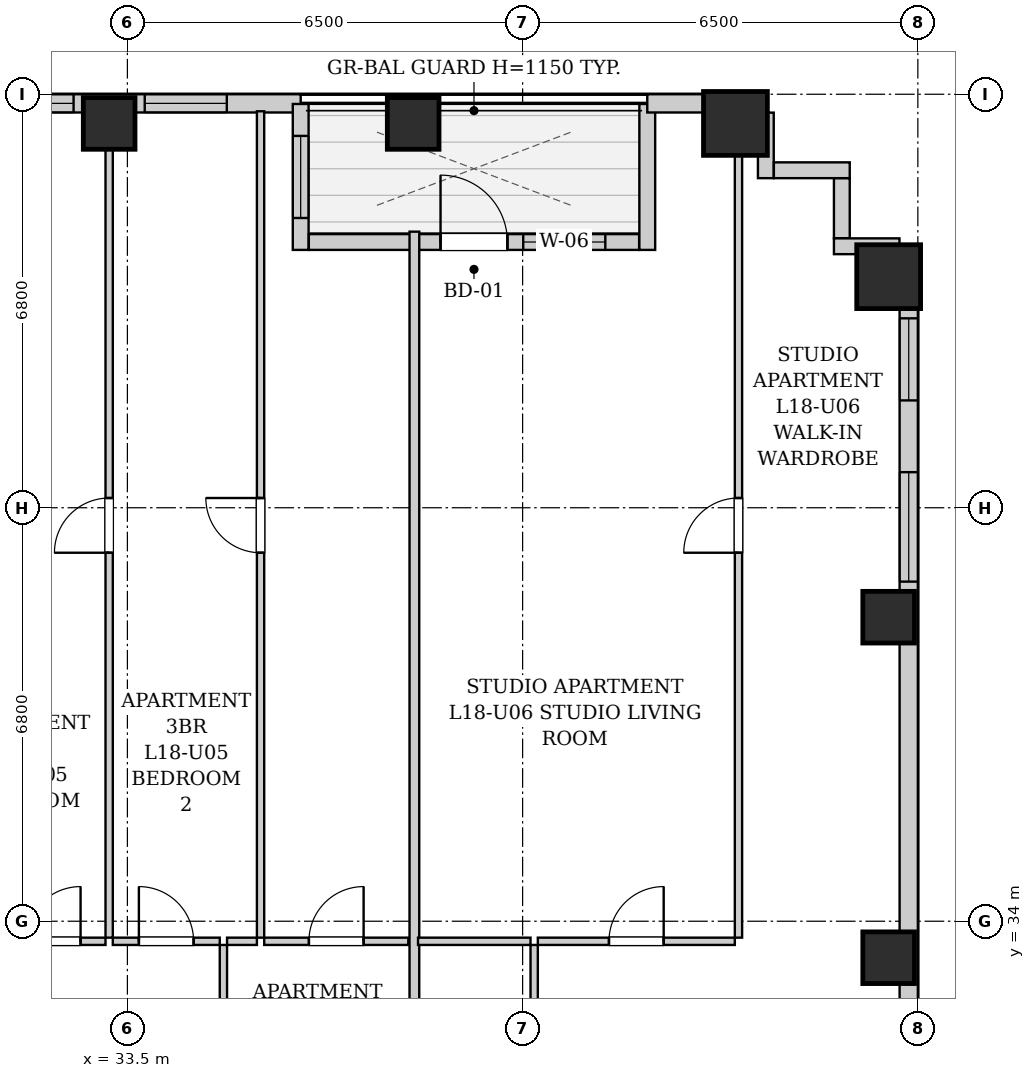
"""IFC4 building model, lengths in metres.
Left out: names, types, materials, properties, quantities, classifications, styles, units other than length and angle.
Written with IfcOpenShell. Run it as: python <this file> out.ifc"""

import sys

from ifc_helpers import new_model, si_unit, direction, frame, frame_2d, origin, origin_2d, place, context, subcontext, project, spatial, rectangle, extrude, element, fill, save


model = new_model("IFC4")
c1 = context("Model", 3, precision=1e-05, world=origin(), true_north=direction((0.0, 1.0)))
c2 = subcontext(c1, "Body", "Model", "MODEL_VIEW")
j1 = project(units=[si_unit("LENGTHUNIT", "METRE"), si_unit("PLANEANGLEUNIT", "RADIAN")], contexts=[c1])
p1 = place(None, origin())
s1 = spatial("IfcSite", under=j1, at=p1, CompositionType="ELEMENT")
p2 = place(p1, origin())
s2 = spatial("IfcBuilding", under=s1, at=p2, CompositionType="ELEMENT")
p3 = place(p2, frame((0.0, 0.0, 67.4)))
s3 = spatial("IfcBuildingStorey", under=s2, at=p3, CompositionType="ELEMENT", Elevation=67.4)
for number, where, z_axis, x_axis in (
    (1, (33.2, 47.12, 0.0), (0.0, 0.0, 1.0), (1.0, 0.0, 0.0)),
    (2, (38.2, 47.12, 0.0), (0.0, 0.0, 1.0), (1.0, 0.0, 0.0)),
):
    element("IfcColumn", number, at=place(p3, frame(where, z_axis=z_axis, x_axis=x_axis)), inside=s3, PredefinedType="COLUMN", context=c2, shape_type="SweptSolid", body=[
        extrude(rectangle(XDim=0.85, YDim=0.85, at=origin_2d()), origin(), (0.0, 0.0, 1.0), 3.2),
    ])
p4 = place(p3, frame((43.5, 47.12, 0.0), z_axis=(0.0, 0.0, 1.0), x_axis=(1.0, 0.0, 0.0)))
e3 = element("IfcColumn", 3, at=p4, inside=s3, PredefinedType="COLUMN", context=c2, shape_type="SweptSolid", body=[
    extrude(rectangle(XDim=1.05, YDim=1.05, at=origin_2d()), origin(), (0.0, 0.0, 1.0), 3.2),
])
for number, where, z_axis, x_axis in (
    (4, (46.02, 33.4, 0.0), (0.0, 0.0, 1.0), (1.0, 0.0, 0.0)),
    (5, (46.02, 39.0, 0.0), (0.0, 0.0, 1.0), (1.0, 0.0, 0.0)),
):
    element("IfcColumn", number, at=place(p3, frame(where, z_axis=z_axis, x_axis=x_axis)), inside=s3, PredefinedType="COLUMN", context=c2, shape_type="SweptSolid", body=[
        extrude(rectangle(XDim=0.85, YDim=0.85, at=origin_2d()), origin(), (0.0, 0.0, 1.0), 3.2),
    ])
p5 = place(p3, frame((46.02, 44.6, 0.0), z_axis=(0.0, 0.0, 1.0), x_axis=(1.0, 0.0, 0.0)))
e6 = element("IfcColumn", 6, at=p5, inside=s3, PredefinedType="COLUMN", context=c2, shape_type="SweptSolid", body=[
    extrude(rectangle(XDim=1.05, YDim=1.05, at=origin_2d()), origin(), (0.0, 0.0, 1.0), 3.2),
])
p6 = place(p3, frame((10.0, 47.45, 0.0), z_axis=(0.0, 0.0, 1.0), x_axis=(1.0, 0.0, 0.0)))
e7 = element("IfcWall", 7, at=p6, inside=s3, PredefinedType="SOLIDWALL", context=c2, shape_type="SweptSolid", body=[
    extrude(rectangle(XDim=26.35, YDim=0.3, at=frame_2d((13.175, 0.0))), origin(), (0.0, 0.0, 1.0), 1.915),
])
p7 = place(p6, frame((1.735, 0.0, 0.55)))
e8 = element("IfcOpeningElement", 8, at=p7, cuts=e7, PredefinedType="OPENING", context=c2, shape_type="SweptSolid", body=[
    extrude(rectangle(XDim=1.8, YDim=1.2, at=frame_2d((0.9, 0.6))), frame((0.0, 0.16, 0.0), z_axis=(0.0, -1.0, 0.0), x_axis=(1.0, 0.0, 0.0)), (0.0, 0.0, 1.0), 0.32),
])
p8 = place(p6, frame((5.415, 0.0, 0.55)))
e9 = element("IfcOpeningElement", 9, at=p8, cuts=e7, PredefinedType="OPENING", context=c2, shape_type="SweptSolid", body=[
    extrude(rectangle(XDim=1.8, YDim=1.2, at=frame_2d((0.9, 0.6))), frame((0.0, 0.16, 0.0), z_axis=(0.0, -1.0, 0.0), x_axis=(1.0, 0.0, 0.0)), (0.0, 0.0, 1.0), 0.32),
])
p9 = place(p6, frame((10.618, 0.0, 0.55)))
e10 = element("IfcOpeningElement", 10, at=p9, cuts=e7, PredefinedType="OPENING", context=c2, shape_type="SweptSolid", body=[
    extrude(rectangle(XDim=1.8, YDim=1.2, at=frame_2d((0.9, 0.6))), frame((0.0, 0.16, 0.0), z_axis=(0.0, -1.0, 0.0), x_axis=(1.0, 0.0, 0.0)), (0.0, 0.0, 1.0), 0.32),
])
p10 = place(p6, frame((17.696, 0.0, 0.55)))
e11 = element("IfcOpeningElement", 11, at=p10, cuts=e7, PredefinedType="OPENING", context=c2, shape_type="SweptSolid", body=[
    extrude(rectangle(XDim=1.8, YDim=1.2, at=frame_2d((0.9, 0.6))), frame((0.0, 0.16, 0.0), z_axis=(0.0, -1.0, 0.0), x_axis=(1.0, 0.0, 0.0)), (0.0, 0.0, 1.0), 0.32),
])
p11 = place(p6, frame((20.815, 0.0, 0.55)))
e12 = element("IfcOpeningElement", 12, at=p11, cuts=e7, PredefinedType="OPENING", context=c2, shape_type="SweptSolid", body=[
    extrude(rectangle(XDim=1.8, YDim=1.2, at=frame_2d((0.9, 0.6))), frame((0.0, 0.16, 0.0), z_axis=(0.0, -1.0, 0.0), x_axis=(1.0, 0.0, 0.0)), (0.0, 0.0, 1.0), 0.32),
])
p12 = place(p6, frame((23.785, 0.0, 0.55)))
e13 = element("IfcOpeningElement", 13, at=p12, cuts=e7, PredefinedType="OPENING", context=c2, shape_type="SweptSolid", body=[
    extrude(rectangle(XDim=1.35, YDim=1.2, at=frame_2d((0.675, 0.6))), frame((0.0, 0.16, 0.0), z_axis=(0.0, -1.0, 0.0), x_axis=(1.0, 0.0, 0.0)), (0.0, 0.0, 1.0), 0.32),
])
p13 = place(p3, frame((36.35, 47.44, 0.0), z_axis=(0.0, 0.0, 1.0), x_axis=(0.0, -1.0, 0.0)))
e14 = element("IfcWall", 14, at=p13, inside=s3, PredefinedType="SOLIDWALL", context=c2, shape_type="SweptSolid", body=[
    extrude(rectangle(XDim=2.4, YDim=0.26, at=frame_2d((1.2, 0.0))), origin(), (0.0, 0.0, 1.0), 2.88),
])
p14 = place(p13, frame((0.525, 0.0, 0.55)))
e15 = element("IfcOpeningElement", 15, at=p14, cuts=e14, PredefinedType="OPENING", context=c2, shape_type="SweptSolid", body=[
    extrude(rectangle(XDim=1.35, YDim=1.2, at=frame_2d((0.675, 0.6))), frame((0.0, 0.14, 0.0), z_axis=(0.0, -1.0, 0.0), x_axis=(1.0, 0.0, 0.0)), (0.0, 0.0, 1.0), 0.28),
])
p15 = place(p3, frame((36.484, 45.17, 0.0), z_axis=(0.0, 0.0, 1.0), x_axis=(1.0, 0.0, 0.0)))
e16 = element("IfcWall", 16, at=p15, inside=s3, PredefinedType="SOLIDWALL", context=c2, shape_type="SweptSolid", body=[
    extrude(rectangle(XDim=5.432, YDim=0.26, at=frame_2d((2.716, 0.0))), origin(), (0.0, 0.0, 1.0), 2.88),
])
p16 = place(p15, frame((2.166, 0.0, 0.0)))
e17 = element("IfcOpeningElement", 17, at=p16, cuts=e16, PredefinedType="OPENING", context=c2, shape_type="SweptSolid", body=[
    extrude(rectangle(XDim=1.1, YDim=2.0, at=frame_2d((0.55, 1.0))), frame((0.0, 0.14, 0.0), z_axis=(0.0, -1.0, 0.0), x_axis=(1.0, 0.0, 0.0)), (0.0, 0.0, 1.0), 0.28),
])
p17 = place(p15, frame((3.526, 0.0, 0.85)))
e18 = element("IfcOpeningElement", 18, at=p17, cuts=e16, PredefinedType="OPENING", context=c2, shape_type="SweptSolid", body=[
    extrude(rectangle(XDim=1.35, YDim=1.65, at=frame_2d((0.675, 0.825))), frame((0.0, 0.14, 0.0), z_axis=(0.0, -1.0, 0.0), x_axis=(1.0, 0.0, 0.0)), (0.0, 0.0, 1.0), 0.28),
])
p18 = place(p3, frame((42.05, 45.04, 0.0), z_axis=(0.0, 0.0, 1.0), x_axis=(0.0, 1.0, 0.0)))
e19 = element("IfcWall", 19, at=p18, inside=s3, PredefinedType="SOLIDWALL", context=c2, shape_type="SweptSolid", body=[
    extrude(rectangle(XDim=2.4, YDim=0.26, at=frame_2d((1.2, 0.0))), origin(), (0.0, 0.0, 1.0), 2.88),
])
p19 = place(p3, frame((42.05, 47.45, 0.0), z_axis=(0.0, 0.0, 1.0), x_axis=(1.0, 0.0, 0.0)))
e20 = element("IfcWall", 20, at=p19, inside=s3, PredefinedType="SOLIDWALL", context=c2, shape_type="SweptSolid", body=[
    extrude(rectangle(XDim=1.95, YDim=0.3, at=frame_2d((0.975, 0.0))), origin(), (0.0, 0.0, 1.0), 1.915),
])
p20 = place(p3, frame((46.35, 45.1, 0.0), z_axis=(0.0, 0.0, 1.0), x_axis=(0.0, -1.0, 0.0)))
e21 = element("IfcWall", 21, at=p20, inside=s3, PredefinedType="SOLIDWALL", context=c2, shape_type="SweptSolid", body=[
    extrude(rectangle(XDim=16.9, YDim=0.3, at=frame_2d((8.45, 0.0))), origin(), (0.0, 0.0, 1.0), 1.915),
])
p21 = place(p20, frame((3.715, 0.0, 0.55)))
e22 = element("IfcOpeningElement", 22, at=p21, cuts=e21, PredefinedType="OPENING", context=c2, shape_type="SweptSolid", body=[
    extrude(rectangle(XDim=1.8, YDim=1.2, at=frame_2d((0.9, 0.6))), frame((0.0, 0.16, 0.0), z_axis=(0.0, -1.0, 0.0), x_axis=(1.0, 0.0, 0.0)), (0.0, 0.0, 1.0), 0.32),
])
p22 = place(p20, frame((1.185, 0.0, 0.55)))
e23 = element("IfcOpeningElement", 23, at=p22, cuts=e21, PredefinedType="OPENING", context=c2, shape_type="SweptSolid", body=[
    extrude(rectangle(XDim=1.35, YDim=1.2, at=frame_2d((0.675, 0.6))), frame((0.0, 0.16, 0.0), z_axis=(0.0, -1.0, 0.0), x_axis=(1.0, 0.0, 0.0)), (0.0, 0.0, 1.0), 0.32),
])
p23 = place(p3, frame((44.0, 47.298, 0.0), z_axis=(0.0, 0.0, 1.0), x_axis=(0.0, -1.0, 0.0)))
e24 = element("IfcWall", 24, at=p23, inside=s3, PredefinedType="SOLIDWALL", context=c2, shape_type="SweptSolid", body=[
    extrude(rectangle(XDim=1.078, YDim=0.26, at=frame_2d((0.539, 0.0))), origin(), (0.0, 0.0, 1.0), 2.88),
])
p24 = place(p3, frame((44.132, 46.35, 0.0), z_axis=(0.0, 0.0, 1.0), x_axis=(1.0, 0.0, 0.0)))
e25 = element("IfcWall", 25, at=p24, inside=s3, PredefinedType="SOLIDWALL", context=c2, shape_type="SweptSolid", body=[
    extrude(rectangle(XDim=1.248, YDim=0.26, at=frame_2d((0.624, 0.0))), origin(), (0.0, 0.0, 1.0), 2.88),
])
p25 = place(p3, frame((45.25, 46.218, 0.0), z_axis=(0.0, 0.0, 1.0), x_axis=(0.0, -1.0, 0.0)))
e26 = element("IfcWall", 26, at=p25, inside=s3, PredefinedType="SOLIDWALL", context=c2, shape_type="SweptSolid", body=[
    extrude(rectangle(XDim=0.986, YDim=0.26, at=frame_2d((0.493, 0.0))), origin(), (0.0, 0.0, 1.0), 2.88),
])
p26 = place(p3, frame((45.12, 45.1, 0.0), z_axis=(0.0, 0.0, 1.0), x_axis=(1.0, 0.0, 0.0)))
e27 = element("IfcWall", 27, at=p26, inside=s3, PredefinedType="SOLIDWALL", context=c2, shape_type="SweptSolid", body=[
    extrude(rectangle(XDim=1.078, YDim=0.26, at=frame_2d((0.539, 0.0))), origin(), (0.0, 0.0, 1.0), 2.88),
])
p27 = place(p3, frame((35.079, 30.76, 0.0), z_axis=(0.0, 0.0, 1.0), x_axis=(0.0, 1.0, 0.0)))
e28 = element("IfcWall", 28, at=p27, inside=s3, PredefinedType="PARTITIONING", context=c2, shape_type="SweptSolid", body=[
    extrude(rectangle(XDim=2.85, YDim=0.12, at=frame_2d((1.425, 0.0))), origin(), (0.0, 0.0, 1.0), 2.88),
])
p28 = place(p27, frame((0.975, 0.0, 0.0)))
e29 = element("IfcOpeningElement", 29, at=p28, cuts=e28, PredefinedType="OPENING", context=c2, shape_type="SweptSolid", body=[
    extrude(rectangle(XDim=0.9, YDim=2.05, at=frame_2d((0.45, 1.025))), frame((0.0, 0.07, 0.0), z_axis=(0.0, -1.0, 0.0), x_axis=(1.0, 0.0, 0.0)), (0.0, 0.0, 1.0), 0.14),
])
p29 = place(p3, frame((31.419, 33.67, 0.0), z_axis=(0.0, 0.0, 1.0), x_axis=(1.0, 0.0, 0.0)))
e30 = element("IfcWall", 30, at=p29, inside=s3, PredefinedType="PARTITIONING", context=c2, shape_type="SweptSolid", body=[
    extrude(rectangle(XDim=1.721, YDim=0.12, at=frame_2d((0.86, 0.0))), origin(), (0.0, 0.0, 1.0), 2.88),
])
p30 = place(p29, frame((0.411, 0.0, 0.0)))
e31 = element("IfcOpeningElement", 31, at=p30, cuts=e30, PredefinedType="OPENING", context=c2, shape_type="SweptSolid", body=[
    extrude(rectangle(XDim=0.9, YDim=2.05, at=frame_2d((0.45, 1.025))), frame((0.0, 0.07, 0.0), z_axis=(0.0, -1.0, 0.0), x_axis=(1.0, 0.0, 0.0)), (0.0, 0.0, 1.0), 0.14),
])
p31 = place(p3, frame((33.26, 33.67, 0.0), z_axis=(0.0, 0.0, 1.0), x_axis=(1.0, 0.0, 0.0)))
e32 = element("IfcWall", 32, at=p31, inside=s3, PredefinedType="PARTITIONING", context=c2, shape_type="SweptSolid", body=[
    extrude(rectangle(XDim=1.759, YDim=0.12, at=frame_2d((0.879, 0.0))), origin(), (0.0, 0.0, 1.0), 2.88),
])
p32 = place(p31, frame((0.429, 0.0, 0.0)))
e33 = element("IfcOpeningElement", 33, at=p32, cuts=e32, PredefinedType="OPENING", context=c2, shape_type="SweptSolid", body=[
    extrude(rectangle(XDim=0.9, YDim=2.05, at=frame_2d((0.45, 1.025))), frame((0.0, 0.07, 0.0), z_axis=(0.0, -1.0, 0.0), x_axis=(1.0, 0.0, 0.0)), (0.0, 0.0, 1.0), 0.14),
])
p33 = place(p3, frame((35.139, 33.67, 0.0), z_axis=(0.0, 0.0, 1.0), x_axis=(1.0, 0.0, 0.0)))
e34 = element("IfcWall", 34, at=p33, inside=s3, PredefinedType="PARTITIONING", context=c2, shape_type="SweptSolid", body=[
    extrude(rectangle(XDim=0.491, YDim=0.12, at=frame_2d((0.246, 0.0))), origin(), (0.0, 0.0, 1.0), 2.88),
])
p34 = place(p3, frame((35.75, 33.67, 0.0), z_axis=(0.0, 0.0, 1.0), x_axis=(1.0, 0.0, 0.0)))
e35 = element("IfcWall", 35, at=p34, inside=s3, PredefinedType="PARTITIONING", context=c2, shape_type="SweptSolid", body=[
    extrude(rectangle(XDim=2.37, YDim=0.12, at=frame_2d((1.185, 0.0))), origin(), (0.0, 0.0, 1.0), 2.88),
])
p35 = place(p34, frame((0.735, 0.0, 0.0)))
e36 = element("IfcOpeningElement", 36, at=p35, cuts=e35, PredefinedType="OPENING", context=c2, shape_type="SweptSolid", body=[
    extrude(rectangle(XDim=0.9, YDim=2.05, at=frame_2d((0.45, 1.025))), frame((0.0, 0.07, 0.0), z_axis=(0.0, -1.0, 0.0), x_axis=(1.0, 0.0, 0.0)), (0.0, 0.0, 1.0), 0.14),
])
p36 = place(p3, frame((33.2, 33.73, 0.0), z_axis=(0.0, 0.0, 1.0), x_axis=(0.0, 1.0, 0.0)))
e37 = element("IfcWall", 37, at=p36, inside=s3, PredefinedType="PARTITIONING", context=c2, shape_type="SweptSolid", body=[
    extrude(rectangle(XDim=13.59, YDim=0.12, at=frame_2d((6.795, 0.0))), origin(), (0.0, 0.0, 1.0), 2.172),
])
p37 = place(p36, frame((6.33, 0.0, 0.0)))
e38 = element("IfcOpeningElement", 38, at=p37, cuts=e37, PredefinedType="OPENING", context=c2, shape_type="SweptSolid", body=[
    extrude(rectangle(XDim=0.9, YDim=2.05, at=frame_2d((0.45, 1.025))), frame((0.0, 0.07, 0.0), z_axis=(0.0, -1.0, 0.0), x_axis=(1.0, 0.0, 0.0)), (0.0, 0.0, 1.0), 0.14),
])
p38 = place(p3, frame((35.69, 33.73, 0.0), z_axis=(0.0, 0.0, 1.0), x_axis=(0.0, 1.0, 0.0)))
e39 = element("IfcWall", 39, at=p38, inside=s3, PredefinedType="PARTITIONING", context=c2, shape_type="SweptSolid", body=[
    extrude(rectangle(XDim=13.59, YDim=0.12, at=frame_2d((6.795, 0.0))), origin(), (0.0, 0.0, 1.0), 2.88),
])
p39 = place(p38, frame((6.33, 0.0, 0.0)))
e40 = element("IfcOpeningElement", 40, at=p39, cuts=e39, PredefinedType="OPENING", context=c2, shape_type="SweptSolid", body=[
    extrude(rectangle(XDim=0.9, YDim=2.05, at=frame_2d((0.45, 1.025))), frame((0.0, 0.07, 0.0), z_axis=(0.0, -1.0, 0.0), x_axis=(1.0, 0.0, 0.0)), (0.0, 0.0, 1.0), 0.14),
])
p40 = place(p3, frame((38.22, 30.76, 0.0), z_axis=(0.0, 0.0, 1.0), x_axis=(0.0, 1.0, 0.0)))
e41 = element("IfcWall", 41, at=p40, inside=s3, PredefinedType="PARTITIONING", context=c2, shape_type="SweptSolid", body=[
    extrude(rectangle(XDim=14.58, YDim=0.16, at=frame_2d((7.29, 0.0))), origin(), (0.0, 0.0, 1.0), 2.88),
])
p41 = place(p3, frame((40.19, 30.76, 0.0), z_axis=(0.0, 0.0, 1.0), x_axis=(0.0, 1.0, 0.0)))
e42 = element("IfcWall", 42, at=p41, inside=s3, PredefinedType="PARTITIONING", context=c2, shape_type="SweptSolid", body=[
    extrude(rectangle(XDim=2.85, YDim=0.12, at=frame_2d((1.425, 0.0))), origin(), (0.0, 0.0, 1.0), 2.88),
])
p42 = place(p41, frame((0.995, 0.0, 0.0)))
e43 = element("IfcOpeningElement", 43, at=p42, cuts=e42, PredefinedType="OPENING", context=c2, shape_type="SweptSolid", body=[
    extrude(rectangle(XDim=0.86, YDim=2.05, at=frame_2d((0.43, 1.025))), frame((0.0, 0.07, 0.0), z_axis=(0.0, -1.0, 0.0), x_axis=(1.0, 0.0, 0.0)), (0.0, 0.0, 1.0), 0.14),
])
p43 = place(p3, frame((38.28, 33.67, 0.0), z_axis=(0.0, 0.0, 1.0), x_axis=(1.0, 0.0, 0.0)))
e44 = element("IfcWall", 44, at=p43, inside=s3, PredefinedType="PARTITIONING", context=c2, shape_type="SweptSolid", body=[
    extrude(rectangle(XDim=1.85, YDim=0.12, at=frame_2d((0.925, 0.0))), origin(), (0.0, 0.0, 1.0), 2.88),
])
p44 = place(p3, frame((40.25, 33.67, 0.0), z_axis=(0.0, 0.0, 1.0), x_axis=(1.0, 0.0, 0.0)))
e45 = element("IfcWall", 45, at=p44, inside=s3, PredefinedType="PARTITIONING", context=c2, shape_type="SweptSolid", body=[
    extrude(rectangle(XDim=3.24, YDim=0.12, at=frame_2d((1.62, 0.0))), origin(), (0.0, 0.0, 1.0), 2.88),
])
p45 = place(p44, frame((1.17, 0.0, 0.0)))
e46 = element("IfcOpeningElement", 46, at=p45, cuts=e45, PredefinedType="OPENING", context=c2, shape_type="SweptSolid", body=[
    extrude(rectangle(XDim=0.9, YDim=2.05, at=frame_2d((0.45, 1.025))), frame((0.0, 0.07, 0.0), z_axis=(0.0, -1.0, 0.0), x_axis=(1.0, 0.0, 0.0)), (0.0, 0.0, 1.0), 0.14),
])
p46 = place(p3, frame((43.55, 33.73, 0.0), z_axis=(0.0, 0.0, 1.0), x_axis=(0.0, 1.0, 0.0)))
e47 = element("IfcWall", 47, at=p46, inside=s3, PredefinedType="PARTITIONING", context=c2, shape_type="SweptSolid", body=[
    extrude(rectangle(XDim=13.59, YDim=0.12, at=frame_2d((6.795, 0.0))), origin(), (0.0, 0.0, 1.0), 2.88),
])
p47 = place(p46, frame((6.33, 0.0, 0.0)))
e48 = element("IfcOpeningElement", 48, at=p47, cuts=e47, PredefinedType="OPENING", context=c2, shape_type="SweptSolid", body=[
    extrude(rectangle(XDim=0.9, YDim=2.05, at=frame_2d((0.45, 1.025))), frame((0.0, 0.07, 0.0), z_axis=(0.0, -1.0, 0.0), x_axis=(1.0, 0.0, 0.0)), (0.0, 0.0, 1.0), 0.14),
])
p48 = place(p30, origin())
e49 = element("IfcDoor", 49, at=p48, inside=s3, OperationType="SINGLE_SWING_RIGHT", PredefinedType="DOOR", context=c2, shape_type="SweptSolid", body=[
    extrude(rectangle(XDim=0.9, YDim=2.05, at=frame_2d((0.45, 1.025))), frame((0.0, 0.025, 0.0), z_axis=(0.0, -1.0, 0.0), x_axis=(1.0, 0.0, 0.0)), (0.0, 0.0, 1.0), 0.05),
])
fill(e31, e49)
p49 = place(p32, origin())
e50 = element("IfcDoor", 50, at=p49, inside=s3, OperationType="SINGLE_SWING_LEFT", PredefinedType="DOOR", context=c2, shape_type="SweptSolid", body=[
    extrude(rectangle(XDim=0.9, YDim=2.05, at=frame_2d((0.45, 1.025))), frame((0.0, 0.025, 0.0), z_axis=(0.0, -1.0, 0.0), x_axis=(1.0, 0.0, 0.0)), (0.0, 0.0, 1.0), 0.05),
])
fill(e33, e50)
p50 = place(p35, origin())
e51 = element("IfcDoor", 51, at=p50, inside=s3, OperationType="SINGLE_SWING_RIGHT", PredefinedType="DOOR", context=c2, shape_type="SweptSolid", body=[
    extrude(rectangle(XDim=0.9, YDim=2.05, at=frame_2d((0.45, 1.025))), frame((0.0, 0.025, 0.0), z_axis=(0.0, -1.0, 0.0), x_axis=(1.0, 0.0, 0.0)), (0.0, 0.0, 1.0), 0.05),
])
fill(e36, e51)
p51 = place(p37, origin())
e52 = element("IfcDoor", 52, at=p51, inside=s3, OperationType="SINGLE_SWING_LEFT", PredefinedType="DOOR", context=c2, shape_type="SweptSolid", body=[
    extrude(rectangle(XDim=0.9, YDim=2.05, at=frame_2d((0.45, 1.025))), frame((0.0, 0.025, 0.0), z_axis=(0.0, -1.0, 0.0), x_axis=(1.0, 0.0, 0.0)), (0.0, 0.0, 1.0), 0.05),
])
fill(e38, e52)
p52 = place(p39, origin())
e53 = element("IfcDoor", 53, at=p52, inside=s3, OperationType="SINGLE_SWING_RIGHT", PredefinedType="DOOR", context=c2, shape_type="SweptSolid", body=[
    extrude(rectangle(XDim=0.9, YDim=2.05, at=frame_2d((0.45, 1.025))), frame((0.0, 0.025, 0.0), z_axis=(0.0, -1.0, 0.0), x_axis=(1.0, 0.0, 0.0)), (0.0, 0.0, 1.0), 0.05),
])
fill(e40, e53)
p53 = place(p45, origin())
e54 = element("IfcDoor", 54, at=p53, inside=s3, OperationType="SINGLE_SWING_RIGHT", PredefinedType="DOOR", context=c2, shape_type="SweptSolid", body=[
    extrude(rectangle(XDim=0.9, YDim=2.05, at=frame_2d((0.45, 1.025))), frame((0.0, 0.025, 0.0), z_axis=(0.0, -1.0, 0.0), x_axis=(1.0, 0.0, 0.0)), (0.0, 0.0, 1.0), 0.05),
])
fill(e46, e54)
p54 = place(p47, origin())
e55 = element("IfcDoor", 55, at=p54, inside=s3, OperationType="SINGLE_SWING_LEFT", PredefinedType="DOOR", context=c2, shape_type="SweptSolid", body=[
    extrude(rectangle(XDim=0.9, YDim=2.05, at=frame_2d((0.45, 1.025))), frame((0.0, 0.025, 0.0), z_axis=(0.0, -1.0, 0.0), x_axis=(1.0, 0.0, 0.0)), (0.0, 0.0, 1.0), 0.05),
])
fill(e48, e55)
p55 = place(p16, origin())
e56 = element("IfcDoor", 56, at=p55, inside=s3, OperationType="SINGLE_SWING_LEFT", PredefinedType="DOOR", context=c2, shape_type="SweptSolid", body=[
    extrude(rectangle(XDim=1.1, YDim=2.0, at=frame_2d((0.55, 1.0))), frame((0.0, 0.025, 0.0), z_axis=(0.0, -1.0, 0.0), x_axis=(1.0, 0.0, 0.0)), (0.0, 0.0, 1.0), 0.05),
])
fill(e17, e56)
p56 = place(p11, origin())
e57 = element("IfcWindow", 57, at=p56, inside=s3, PartitioningType="DOUBLE_PANEL_VERTICAL", PredefinedType="WINDOW", context=c2, shape_type="SweptSolid", body=[
    extrude(rectangle(XDim=1.8, YDim=1.2, at=frame_2d((0.9, 0.6))), frame((0.0, 0.03, 0.0), z_axis=(0.0, -1.0, 0.0), x_axis=(1.0, 0.0, 0.0)), (0.0, 0.0, 1.0), 0.06),
])
fill(e12, e57)
p57 = place(p12, origin())
e58 = element("IfcWindow", 58, at=p57, inside=s3, PartitioningType="SINGLE_PANEL", PredefinedType="WINDOW", context=c2, shape_type="SweptSolid", body=[
    extrude(rectangle(XDim=1.35, YDim=1.2, at=frame_2d((0.675, 0.6))), frame((0.0, 0.03, 0.0), z_axis=(0.0, -1.0, 0.0), x_axis=(1.0, 0.0, 0.0)), (0.0, 0.0, 1.0), 0.06),
])
fill(e13, e58)
p58 = place(p14, origin())
e59 = element("IfcWindow", 59, at=p58, inside=s3, PartitioningType="SINGLE_PANEL", PredefinedType="WINDOW", context=c2, shape_type="SweptSolid", body=[
    extrude(rectangle(XDim=1.35, YDim=1.2, at=frame_2d((0.675, 0.6))), frame((0.0, 0.03, 0.0), z_axis=(0.0, -1.0, 0.0), x_axis=(1.0, 0.0, 0.0)), (0.0, 0.0, 1.0), 0.06),
])
fill(e15, e59)
p59 = place(p17, origin())
e60 = element("IfcWindow", 60, at=p59, inside=s3, PartitioningType="SINGLE_PANEL", PredefinedType="WINDOW", context=c2, shape_type="SweptSolid", body=[
    extrude(rectangle(XDim=1.35, YDim=1.65, at=frame_2d((0.675, 0.825))), frame((0.0, 0.03, 0.0), z_axis=(0.0, -1.0, 0.0), x_axis=(1.0, 0.0, 0.0)), (0.0, 0.0, 1.0), 0.06),
])
fill(e18, e60)
p60 = place(p21, origin())
e61 = element("IfcWindow", 61, at=p60, inside=s3, PartitioningType="DOUBLE_PANEL_VERTICAL", PredefinedType="WINDOW", context=c2, shape_type="SweptSolid", body=[
    extrude(rectangle(XDim=1.8, YDim=1.2, at=frame_2d((0.9, 0.6))), frame((0.0, 0.03, 0.0), z_axis=(0.0, -1.0, 0.0), x_axis=(1.0, 0.0, 0.0)), (0.0, 0.0, 1.0), 0.06),
])
fill(e22, e61)
p61 = place(p22, origin())
e62 = element("IfcWindow", 62, at=p61, inside=s3, PartitioningType="SINGLE_PANEL", PredefinedType="WINDOW", context=c2, shape_type="SweptSolid", body=[
    extrude(rectangle(XDim=1.35, YDim=1.2, at=frame_2d((0.675, 0.6))), frame((0.0, 0.03, 0.0), z_axis=(0.0, -1.0, 0.0), x_axis=(1.0, 0.0, 0.0)), (0.0, 0.0, 1.0), 0.06),
])
fill(e23, e62)
save(model, sys.argv[1])
